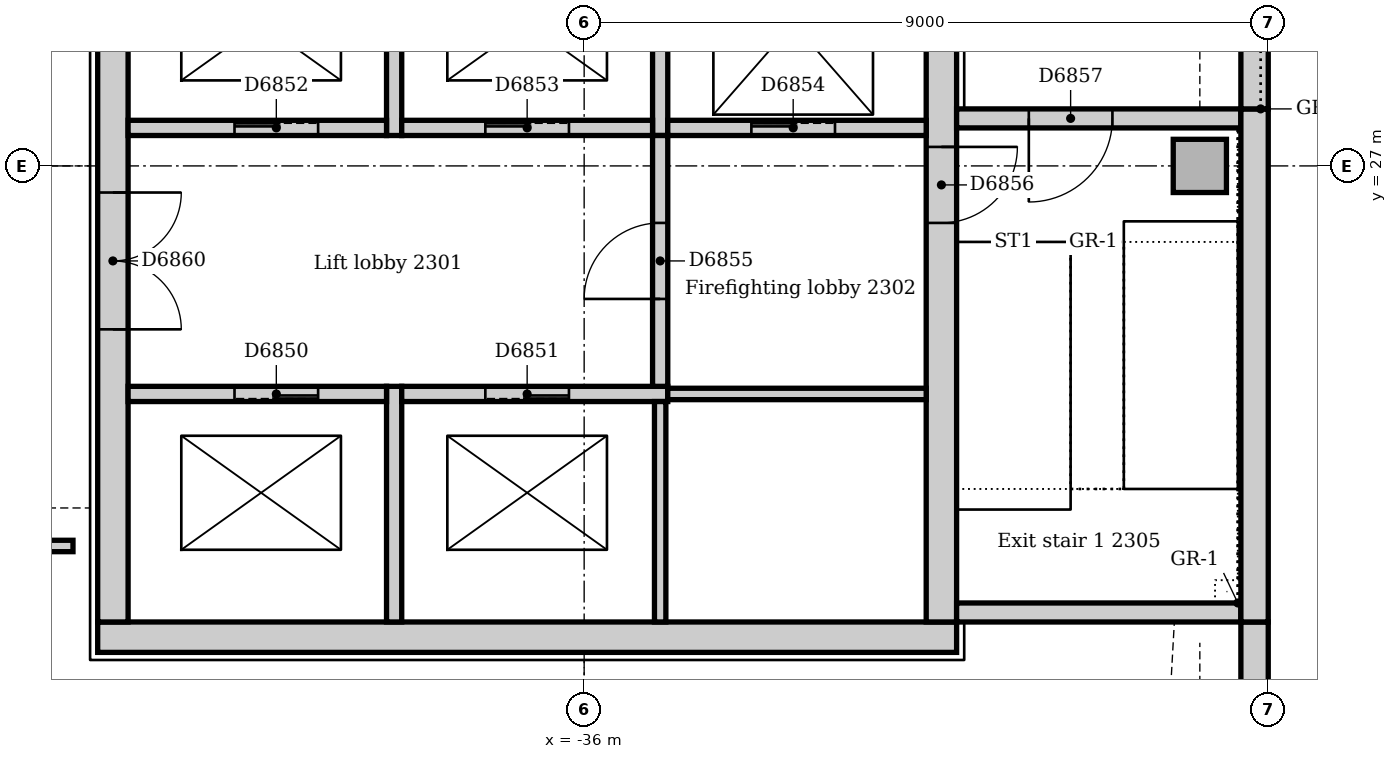
"""IFC4 building model, lengths in metres.
Left out: names, types, materials, properties, quantities, classifications, styles, units other than length and angle.
Written with IfcOpenShell. Run it as: python <this file> out.ifc"""

import sys

from ifc_helpers import new_model, si_unit, direction, frame, frame_2d, origin, origin_2d, place, context, subcontext, project, spatial, rectangle, extrude, element, fill, save


model = new_model("IFC4")
c1 = context("Model", 3, precision=1e-05, world=origin(), true_north=direction((0.0, 1.0)))
c2 = subcontext(c1, "Body", "Model", "MODEL_VIEW")
j1 = project(units=[si_unit("LENGTHUNIT", "METRE"), si_unit("PLANEANGLEUNIT", "RADIAN")], contexts=[c1])
p1 = place(None, origin())
s1 = spatial("IfcSite", under=j1, at=p1, CompositionType="ELEMENT")
p2 = place(p1, origin())
s2 = spatial("IfcBuilding", under=s1, at=p2, CompositionType="ELEMENT")
p3 = place(p2, frame((0.0, 0.0, 100.0)))
s3 = spatial("IfcBuildingStorey", under=s2, at=p3, CompositionType="ELEMENT", Elevation=100.0)
p4 = place(p3, frame((-42.4, 20.8, 0.0), z_axis=(0.0, 0.0, 1.0), x_axis=(1.0, 0.0, 0.0)))
e1 = element("IfcWall", 1, at=p4, inside=s3, PredefinedType="SOLIDWALL", context=c2, shape_type="SweptSolid", body=[
    extrude(rectangle(XDim=11.3, YDim=0.4, at=frame_2d((5.65, 0.0))), origin(), (0.0, 0.0, 1.0), 4.0),
])
p5 = place(p3, frame((-31.3, 21.0, 0.0), z_axis=(0.0, 0.0, 1.0), x_axis=(0.0, 1.0, 0.0)))
e2 = element("IfcWall", 2, at=p5, inside=s3, PredefinedType="SOLIDWALL", context=c2, shape_type="SweptSolid", body=[
    extrude(rectangle(XDim=9.5, YDim=0.4, at=frame_2d((4.75, 0.0))), origin(), (0.0, 0.0, 1.0), 4.0),
])
p6 = place(p5, frame((5.25, 0.0, 0.0)))
e3 = element("IfcOpeningElement", 3, at=p6, cuts=e2, PredefinedType="OPENING", context=c2, shape_type="SweptSolid", body=[
    extrude(rectangle(XDim=1.0, YDim=2.1, at=frame_2d((0.5, 1.05))), frame((0.0, 0.21, 0.0), z_axis=(0.0, -1.0, 0.0), x_axis=(1.0, 0.0, 0.0)), (0.0, 0.0, 1.0), 0.42),
])
p7 = place(p3, frame((-42.2, 30.5, 0.0), z_axis=(0.0, 0.0, 1.0), x_axis=(0.0, -1.0, 0.0)))
e4 = element("IfcWall", 4, at=p7, inside=s3, PredefinedType="SOLIDWALL", context=c2, shape_type="SweptSolid", body=[
    extrude(rectangle(XDim=9.5, YDim=0.4, at=frame_2d((4.75, 0.0))), origin(), (0.0, 0.0, 1.0), 4.0),
])
p8 = place(p7, frame((3.85, 0.0, 0.0)))
e5 = element("IfcOpeningElement", 5, at=p8, cuts=e4, PredefinedType="OPENING", context=c2, shape_type="SweptSolid", body=[
    extrude(rectangle(XDim=1.8, YDim=2.1, at=frame_2d((0.9, 1.05))), frame((0.0, 0.21, 0.0), z_axis=(0.0, -1.0, 0.0), x_axis=(1.0, 0.0, 0.0)), (0.0, 0.0, 1.0), 0.42),
])
p9 = place(p3, frame((-31.1, 21.125, 0.0), z_axis=(0.0, 0.0, 1.0), x_axis=(1.0, 0.0, 0.0)))
e6 = element("IfcWall", 6, at=p9, inside=s3, PredefinedType="SOLIDWALL", context=c2, shape_type="SweptSolid", body=[
    extrude(rectangle(XDim=3.74, YDim=0.25, at=frame_2d((1.87, 0.0))), origin(), (0.0, 0.0, 1.0), 4.0),
])
p10 = place(p3, frame((-27.36, 27.625, 0.0), z_axis=(0.0, 0.0, 1.0), x_axis=(-1.0, 0.0, 0.0)))
e7 = element("IfcWall", 7, at=p10, inside=s3, PredefinedType="SOLIDWALL", context=c2, shape_type="SweptSolid", body=[
    extrude(rectangle(XDim=3.74, YDim=0.25, at=frame_2d((1.87, 0.0))), origin(), (0.0, 0.0, 1.0), 4.0),
])
p11 = place(p10, frame((1.69, 0.0, 0.0)))
e8 = element("IfcOpeningElement", 8, at=p11, cuts=e7, PredefinedType="OPENING", context=c2, shape_type="SweptSolid", body=[
    extrude(rectangle(XDim=1.1, YDim=2.1, at=frame_2d((0.55, 1.05))), frame((0.0, 0.135, 0.0), z_axis=(0.0, -1.0, 0.0), x_axis=(1.0, 0.0, 0.0)), (0.0, 0.0, 1.0), 0.27),
])
p12 = place(p3, frame((-27.9, 27.0, 0.0), z_axis=(0.0, 0.0, 1.0), x_axis=(1.0, 0.0, 0.0)))
e9 = element("IfcColumn", 9, at=p12, inside=s3, PredefinedType="COLUMN", context=c2, shape_type="SweptSolid", body=[
    extrude(rectangle(XDim=0.7, YDim=0.7, at=origin_2d()), origin(), (0.0, 0.0, 1.0), 4.0),
])
p13 = place(p3, frame((-27.18, 17.743, 0.0), z_axis=(0.0, 0.0, 1.0), x_axis=(0.0, 1.0, 0.0)))
e10 = element("IfcWall", 10, at=p13, inside=s3, PredefinedType="STANDARD", context=c2, shape_type="SweptSolid", body=[
    extrude(rectangle(XDim=3.257, YDim=0.36, at=frame_2d((1.629, 0.0))), origin(), (0.0, 0.0, 1.0), 3.85),
])
p14 = place(p3, frame((-27.18, 21.0, 0.0), z_axis=(0.0, 0.0, 1.0), x_axis=(0.0, 1.0, 0.0)))
e11 = element("IfcWall", 11, at=p14, inside=s3, PredefinedType="STANDARD", context=c2, shape_type="SweptSolid", body=[
    extrude(rectangle(XDim=6.75, YDim=0.36, at=frame_2d((3.375, 0.0))), origin(), (0.0, 0.0, 1.0), 3.85),
])
p15 = place(p3, frame((-27.18, 27.75, 0.0), z_axis=(0.0, 0.0, 1.0), x_axis=(0.0, 1.0, 0.0)))
e12 = element("IfcWall", 12, at=p15, inside=s3, PredefinedType="STANDARD", context=c2, shape_type="SweptSolid", body=[
    extrude(rectangle(XDim=7.5, YDim=0.36, at=frame_2d((3.75, 0.0))), origin(), (0.0, 0.0, 1.0), 3.85),
])
p16 = place(p15, frame((2.85, 0.0, 1.2)))
e13 = element("IfcOpeningElement", 13, at=p16, cuts=e12, PredefinedType="OPENING", context=c2, shape_type="SweptSolid", body=[
    extrude(rectangle(XDim=1.8, YDim=1.2, at=frame_2d((0.9, 0.6))), frame((0.0, 0.19, 0.0), z_axis=(0.0, -1.0, 0.0), x_axis=(1.0, 0.0, 0.0)), (0.0, 0.0, 1.0), 0.38),
])
p17 = place(p3, frame((-38.5, 21.0, 0.0), z_axis=(0.0, 0.0, 1.0), x_axis=(0.0, 1.0, 0.0)))
e14 = element("IfcWall", 14, at=p17, inside=s3, PredefinedType="SOLIDWALL", context=c2, shape_type="SweptSolid", body=[
    extrude(rectangle(XDim=3.1, YDim=0.2, at=frame_2d((1.55, 0.0))), origin(), (0.0, 0.0, 1.0), 4.0),
])
p18 = place(p3, frame((-38.6, 24.0, 0.0), z_axis=(0.0, 0.0, 1.0), x_axis=(-1.0, 0.0, 0.0)))
e15 = element("IfcWall", 15, at=p18, inside=s3, PredefinedType="SOLIDWALL", context=c2, shape_type="SweptSolid", body=[
    extrude(rectangle(XDim=3.4, YDim=0.2, at=frame_2d((1.7, 0.0))), origin(), (0.0, 0.0, 1.0), 4.0),
])
p19 = place(p18, frame((0.9, 0.0, 0.0)))
e16 = element("IfcOpeningElement", 16, at=p19, cuts=e15, PredefinedType="OPENING", context=c2, shape_type="SweptSolid", body=[
    extrude(rectangle(XDim=1.1, YDim=2.1, at=frame_2d((0.55, 1.05))), frame((0.0, 0.11, 0.0), z_axis=(0.0, -1.0, 0.0), x_axis=(1.0, 0.0, 0.0)), (0.0, 0.0, 1.0), 0.22),
])
p20 = place(p3, frame((-34.9, 24.0, 0.0), z_axis=(0.0, 0.0, 1.0), x_axis=(-1.0, 0.0, 0.0)))
e17 = element("IfcWall", 17, at=p20, inside=s3, PredefinedType="SOLIDWALL", context=c2, shape_type="SweptSolid", body=[
    extrude(rectangle(XDim=3.5, YDim=0.2, at=frame_2d((1.75, 0.0))), origin(), (0.0, 0.0, 1.0), 4.0),
])
p21 = place(p20, frame((1.3, 0.0, 0.0)))
e18 = element("IfcOpeningElement", 18, at=p21, cuts=e17, PredefinedType="OPENING", context=c2, shape_type="SweptSolid", body=[
    extrude(rectangle(XDim=1.1, YDim=2.1, at=frame_2d((0.55, 1.05))), frame((0.0, 0.11, 0.0), z_axis=(0.0, -1.0, 0.0), x_axis=(1.0, 0.0, 0.0)), (0.0, 0.0, 1.0), 0.22),
])
p22 = place(p3, frame((-38.5, 27.4, 0.0), z_axis=(0.0, 0.0, 1.0), x_axis=(0.0, 1.0, 0.0)))
e19 = element("IfcWall", 19, at=p22, inside=s3, PredefinedType="SOLIDWALL", context=c2, shape_type="SweptSolid", body=[
    extrude(rectangle(XDim=2.85, YDim=0.2, at=frame_2d((1.425, 0.0))), origin(), (0.0, 0.0, 1.0), 4.0),
])
p23 = place(p3, frame((-42.0, 27.5, 0.0), z_axis=(0.0, 0.0, 1.0), x_axis=(1.0, 0.0, 0.0)))
e20 = element("IfcWall", 20, at=p23, inside=s3, PredefinedType="SOLIDWALL", context=c2, shape_type="SweptSolid", body=[
    extrude(rectangle(XDim=3.4, YDim=0.2, at=frame_2d((1.7, 0.0))), origin(), (0.0, 0.0, 1.0), 4.0),
])
p24 = place(p23, frame((1.4, 0.0, 0.0)))
e21 = element("IfcOpeningElement", 21, at=p24, cuts=e20, PredefinedType="OPENING", context=c2, shape_type="SweptSolid", body=[
    extrude(rectangle(XDim=1.1, YDim=2.1, at=frame_2d((0.55, 1.05))), frame((0.0, 0.11, 0.0), z_axis=(0.0, -1.0, 0.0), x_axis=(1.0, 0.0, 0.0)), (0.0, 0.0, 1.0), 0.22),
])
p25 = place(p3, frame((-35.0, 27.4, 0.0), z_axis=(0.0, 0.0, 1.0), x_axis=(0.0, 1.0, 0.0)))
e22 = element("IfcWall", 22, at=p25, inside=s3, PredefinedType="SOLIDWALL", context=c2, shape_type="SweptSolid", body=[
    extrude(rectangle(XDim=2.85, YDim=0.2, at=frame_2d((1.425, 0.0))), origin(), (0.0, 0.0, 1.0), 4.0),
])
p26 = place(p3, frame((-38.4, 27.5, 0.0), z_axis=(0.0, 0.0, 1.0), x_axis=(1.0, 0.0, 0.0)))
e23 = element("IfcWall", 23, at=p26, inside=s3, PredefinedType="SOLIDWALL", context=c2, shape_type="SweptSolid", body=[
    extrude(rectangle(XDim=3.3, YDim=0.2, at=frame_2d((1.65, 0.0))), origin(), (0.0, 0.0, 1.0), 4.0),
])
p27 = place(p26, frame((1.1, 0.0, 0.0)))
e24 = element("IfcOpeningElement", 24, at=p27, cuts=e23, PredefinedType="OPENING", context=c2, shape_type="SweptSolid", body=[
    extrude(rectangle(XDim=1.1, YDim=2.1, at=frame_2d((0.55, 1.05))), frame((0.0, 0.11, 0.0), z_axis=(0.0, -1.0, 0.0), x_axis=(1.0, 0.0, 0.0)), (0.0, 0.0, 1.0), 0.22),
])
p28 = place(p3, frame((-34.9, 27.5, 0.0), z_axis=(0.0, 0.0, 1.0), x_axis=(1.0, 0.0, 0.0)))
e25 = element("IfcWall", 25, at=p28, inside=s3, PredefinedType="SOLIDWALL", context=c2, shape_type="SweptSolid", body=[
    extrude(rectangle(XDim=3.4, YDim=0.2, at=frame_2d((1.7, 0.0))), origin(), (0.0, 0.0, 1.0), 4.0),
])
p29 = place(p28, frame((1.1, 0.0, 0.0)))
e26 = element("IfcOpeningElement", 26, at=p29, cuts=e25, PredefinedType="OPENING", context=c2, shape_type="SweptSolid", body=[
    extrude(rectangle(XDim=1.1, YDim=2.1, at=frame_2d((0.55, 1.05))), frame((0.0, 0.11, 0.0), z_axis=(0.0, -1.0, 0.0), x_axis=(1.0, 0.0, 0.0)), (0.0, 0.0, 1.0), 0.22),
])
p30 = place(p3, frame((-35.0, 24.1, 0.0), z_axis=(0.0, 0.0, 1.0), x_axis=(0.0, 1.0, 0.0)))
e27 = element("IfcWall", 27, at=p30, inside=s3, PredefinedType="SOLIDWALL", context=c2, shape_type="SweptSolid", body=[
    extrude(rectangle(XDim=3.3, YDim=0.2, at=frame_2d((1.65, 0.0))), origin(), (0.0, 0.0, 1.0), 4.0),
])
p31 = place(p30, frame((1.15, 0.0, 0.0)))
e28 = element("IfcOpeningElement", 28, at=p31, cuts=e27, PredefinedType="OPENING", context=c2, shape_type="SweptSolid", body=[
    extrude(rectangle(XDim=1.0, YDim=2.1, at=frame_2d((0.5, 1.05))), frame((0.0, 0.11, 0.0), z_axis=(0.0, -1.0, 0.0), x_axis=(1.0, 0.0, 0.0)), (0.0, 0.0, 1.0), 0.22),
])
p32 = place(p3, frame((-35.0, 21.0, 0.0), z_axis=(0.0, 0.0, 1.0), x_axis=(0.0, 1.0, 0.0)))
e29 = element("IfcWall", 29, at=p32, inside=s3, PredefinedType="SOLIDWALL", context=c2, shape_type="SweptSolid", body=[
    extrude(rectangle(XDim=2.9, YDim=0.15, at=frame_2d((1.45, 0.0))), origin(), (0.0, 0.0, 1.0), 4.0),
])
p33 = place(p3, frame((-31.5, 24.0, 0.0), z_axis=(0.0, 0.0, 1.0), x_axis=(-1.0, 0.0, 0.0)))
e30 = element("IfcWall", 30, at=p33, inside=s3, PredefinedType="SOLIDWALL", context=c2, shape_type="SweptSolid", body=[
    extrude(rectangle(XDim=3.4, YDim=0.15, at=frame_2d((1.7, 0.0))), origin(), (0.0, 0.0, 1.0), 4.0),
])
p34 = place(p3, frame((-59.766, 22.0, 0.0), z_axis=(0.0, 0.0, 1.0), x_axis=(1.0, 0.0, 0.0)))
e31 = element("IfcWall", 31, at=p34, inside=s3, PredefinedType="PARTITIONING", context=c2, shape_type="SweptSolid", body=[
    extrude(rectangle(XDim=17.041, YDim=0.15, at=frame_2d((8.52, 0.0))), origin(), (0.0, 0.0, 1.0), 3.85),
])
p35 = place(p34, frame((15.366, 0.0, 0.0)))
e32 = element("IfcOpeningElement", 32, at=p35, cuts=e31, PredefinedType="OPENING", context=c2, shape_type="SweptSolid", body=[
    extrude(rectangle(XDim=0.9, YDim=2.1, at=frame_2d((0.45, 1.05))), frame((0.0, 0.085, 0.0), z_axis=(0.0, -1.0, 0.0), x_axis=(1.0, 0.0, 0.0)), (0.0, 0.0, 1.0), 0.17),
])
p36 = place(p34, frame((2.5, 0.0, 0.0)))
e33 = element("IfcOpeningElement", 33, at=p36, cuts=e31, PredefinedType="OPENING", context=c2, shape_type="SweptSolid", body=[
    extrude(rectangle(XDim=0.9, YDim=2.1, at=frame_2d((0.45, 1.05))), frame((0.0, 0.085, 0.0), z_axis=(0.0, -1.0, 0.0), x_axis=(1.0, 0.0, 0.0)), (0.0, 0.0, 1.0), 0.17),
])
p37 = place(p34, frame((9.056, 0.0, 0.0)))
e34 = element("IfcOpeningElement", 34, at=p37, cuts=e31, PredefinedType="OPENING", context=c2, shape_type="SweptSolid", body=[
    extrude(rectangle(XDim=1.0, YDim=2.1, at=frame_2d((0.5, 1.05))), frame((0.0, 0.085, 0.0), z_axis=(0.0, -1.0, 0.0), x_axis=(1.0, 0.0, 0.0)), (0.0, 0.0, 1.0), 0.17),
])
p38 = place(p19, origin())
e35 = element("IfcDoor", 35, at=p38, inside=s3, OperationType="SLIDING_TO_LEFT", PredefinedType="DOOR", context=c2, shape_type="SweptSolid", body=[
    extrude(rectangle(XDim=1.1, YDim=2.1, at=frame_2d((0.55, 1.05))), frame((0.0, 0.025, 0.0), z_axis=(0.0, -1.0, 0.0), x_axis=(1.0, 0.0, 0.0)), (0.0, 0.0, 1.0), 0.05),
])
fill(e16, e35)
p39 = place(p21, origin())
e36 = element("IfcDoor", 36, at=p39, inside=s3, OperationType="SLIDING_TO_LEFT", PredefinedType="DOOR", context=c2, shape_type="SweptSolid", body=[
    extrude(rectangle(XDim=1.1, YDim=2.1, at=frame_2d((0.55, 1.05))), frame((0.0, 0.025, 0.0), z_axis=(0.0, -1.0, 0.0), x_axis=(1.0, 0.0, 0.0)), (0.0, 0.0, 1.0), 0.05),
])
fill(e18, e36)
p40 = place(p24, origin())
e37 = element("IfcDoor", 37, at=p40, inside=s3, OperationType="SLIDING_TO_LEFT", PredefinedType="DOOR", context=c2, shape_type="SweptSolid", body=[
    extrude(rectangle(XDim=1.1, YDim=2.1, at=frame_2d((0.55, 1.05))), frame((0.0, 0.025, 0.0), z_axis=(0.0, -1.0, 0.0), x_axis=(1.0, 0.0, 0.0)), (0.0, 0.0, 1.0), 0.05),
])
fill(e21, e37)
p41 = place(p27, origin())
e38 = element("IfcDoor", 38, at=p41, inside=s3, OperationType="SLIDING_TO_LEFT", PredefinedType="DOOR", context=c2, shape_type="SweptSolid", body=[
    extrude(rectangle(XDim=1.1, YDim=2.1, at=frame_2d((0.55, 1.05))), frame((0.0, 0.025, 0.0), z_axis=(0.0, -1.0, 0.0), x_axis=(1.0, 0.0, 0.0)), (0.0, 0.0, 1.0), 0.05),
])
fill(e24, e38)
p42 = place(p29, origin())
e39 = element("IfcDoor", 39, at=p42, inside=s3, OperationType="SLIDING_TO_LEFT", PredefinedType="DOOR", context=c2, shape_type="SweptSolid", body=[
    extrude(rectangle(XDim=1.1, YDim=2.1, at=frame_2d((0.55, 1.05))), frame((0.0, 0.025, 0.0), z_axis=(0.0, -1.0, 0.0), x_axis=(1.0, 0.0, 0.0)), (0.0, 0.0, 1.0), 0.05),
])
fill(e26, e39)
p43 = place(p31, origin())
e40 = element("IfcDoor", 40, at=p43, inside=s3, OperationType="SINGLE_SWING_LEFT", PredefinedType="DOOR", context=c2, shape_type="SweptSolid", body=[
    extrude(rectangle(XDim=1.0, YDim=2.1, at=frame_2d((0.5, 1.05))), frame((0.0, 0.025, 0.0), z_axis=(0.0, -1.0, 0.0), x_axis=(1.0, 0.0, 0.0)), (0.0, 0.0, 1.0), 0.05),
])
fill(e28, e40)
p44 = place(p6, frame((1.0, 0.0, 0.0), z_axis=(0.0, 0.0, 1.0), x_axis=(-1.0, 0.0, 0.0)))
e41 = element("IfcDoor", 41, at=p44, inside=s3, OperationType="SINGLE_SWING_LEFT", PredefinedType="DOOR", context=c2, shape_type="SweptSolid", body=[
    extrude(rectangle(XDim=1.0, YDim=2.1, at=frame_2d((0.5, 1.05))), frame((0.0, 0.025, 0.0), z_axis=(0.0, -1.0, 0.0), x_axis=(1.0, 0.0, 0.0)), (0.0, 0.0, 1.0), 0.05),
])
fill(e3, e41)
p45 = place(p11, origin())
e42 = element("IfcDoor", 42, at=p45, inside=s3, OperationType="SINGLE_SWING_RIGHT", PredefinedType="DOOR", context=c2, shape_type="SweptSolid", body=[
    extrude(rectangle(XDim=1.1, YDim=2.1, at=frame_2d((0.55, 1.05))), frame((0.0, 0.025, 0.0), z_axis=(0.0, -1.0, 0.0), x_axis=(1.0, 0.0, 0.0)), (0.0, 0.0, 1.0), 0.05),
])
fill(e8, e42)
p46 = place(p8, origin())
e43 = element("IfcDoor", 43, at=p46, inside=s3, OperationType="DOUBLE_DOOR_SINGLE_SWING", PredefinedType="DOOR", context=c2, shape_type="SweptSolid", body=[
    extrude(rectangle(XDim=1.8, YDim=2.1, at=frame_2d((0.9, 1.05))), frame((0.0, 0.025, 0.0), z_axis=(0.0, -1.0, 0.0), x_axis=(1.0, 0.0, 0.0)), (0.0, 0.0, 1.0), 0.05),
])
fill(e5, e43)
save(model, sys.argv[1])
